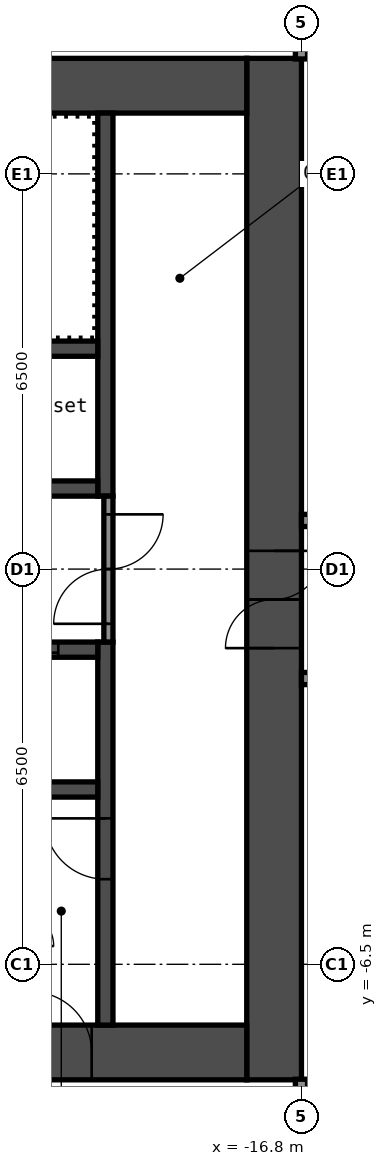
"""IFC4 building model, lengths in metres.
Left out: names, types, materials, properties, quantities, classifications, styles, units other than length and angle.
Written with IfcOpenShell. Run it as: python <this file> out.ifc"""

import sys

from ifc_helpers import new_model, si_unit, direction, frame, frame_2d, origin, place, context, subcontext, project, spatial, rectangle, extrude, element, fill, save


model = new_model("IFC4")
c1 = context("Model", 3, precision=1e-05, world=origin(), true_north=direction((0.0, 1.0)))
c2 = subcontext(c1, "Body", "Model", "MODEL_VIEW")
j1 = project(units=[si_unit("LENGTHUNIT", "METRE"), si_unit("PLANEANGLEUNIT", "RADIAN")], contexts=[c1])
p1 = place(None, origin())
s1 = spatial("IfcSite", under=j1, at=p1, CompositionType="ELEMENT")
p2 = place(p1, origin())
s2 = spatial("IfcBuilding", under=s1, at=p2, CompositionType="ELEMENT")
p3 = place(p2, frame((0.0, 0.0, 131.0)))
s3 = spatial("IfcBuildingStorey", under=s2, at=p3, CompositionType="ELEMENT", Elevation=131.0)
p4 = place(p3, frame((-17.25, -8.4, 0.0), z_axis=(0.0, 0.0, 1.0), x_axis=(0.0, 1.0, 0.0)))
e1 = element("IfcWall", 1, at=p4, inside=s3, PredefinedType="SHEAR", context=c2, shape_type="SweptSolid", body=[
    extrude(rectangle(XDim=16.8, YDim=0.9, at=frame_2d((8.4, 0.0))), origin(), (0.0, 0.0, 1.0), 2.75),
])
p5 = place(p4, frame((7.1, 0.0, 0.0)))
e2 = element("IfcOpeningElement", 2, at=p5, cuts=e1, PredefinedType="OPENING", context=c2, shape_type="SweptSolid", body=[
    extrude(rectangle(XDim=1.6, YDim=2.1, at=frame_2d((0.8, 1.05))), frame((0.0, 0.46, 0.0), z_axis=(0.0, -1.0, 0.0), x_axis=(1.0, 0.0, 0.0)), (0.0, 0.0, 1.0), 0.92),
])
p6 = place(p3, frame((-32.7, 7.95, 0.0), z_axis=(0.0, 0.0, 1.0), x_axis=(1.0, 0.0, 0.0)))
e3 = element("IfcWall", 3, at=p6, inside=s3, PredefinedType="SHEAR", context=c2, shape_type="SweptSolid", body=[
    extrude(rectangle(XDim=15.0, YDim=0.9, at=frame_2d((7.5, 0.0))), origin(), (0.0, 0.0, 1.0), 2.75),
])
p7 = place(p6, frame((3.4, 0.0, 0.0)))
e4 = element("IfcOpeningElement", 4, at=p7, cuts=e3, PredefinedType="OPENING", context=c2, shape_type="SweptSolid", body=[
    extrude(rectangle(XDim=1.2, YDim=2.1, at=frame_2d((0.6, 1.05))), frame((0.0, 0.46, 0.0), z_axis=(0.0, -1.0, 0.0), x_axis=(1.0, 0.0, 0.0)), (0.0, 0.0, 1.0), 0.92),
])
p8 = place(p6, frame((0.75, 0.0, 0.0)))
e5 = element("IfcOpeningElement", 5, at=p8, cuts=e3, PredefinedType="OPENING", context=c2, shape_type="SweptSolid", body=[
    extrude(rectangle(XDim=0.9, YDim=2.1, at=frame_2d((0.45, 1.05))), frame((0.0, 0.46, 0.0), z_axis=(0.0, -1.0, 0.0), x_axis=(1.0, 0.0, 0.0)), (0.0, 0.0, 1.0), 0.92),
])
p9 = place(p3, frame((-32.7, -7.95, 0.0), z_axis=(0.0, 0.0, 1.0), x_axis=(1.0, 0.0, 0.0)))
e6 = element("IfcWall", 6, at=p9, inside=s3, PredefinedType="SHEAR", context=c2, shape_type="SweptSolid", body=[
    extrude(rectangle(XDim=15.0, YDim=0.9, at=frame_2d((7.5, 0.0))), origin(), (0.0, 0.0, 1.0), 2.75),
])
p10 = place(p9, frame((11.45, 0.0, 0.0)))
e7 = element("IfcOpeningElement", 7, at=p10, cuts=e6, PredefinedType="OPENING", context=c2, shape_type="SweptSolid", body=[
    extrude(rectangle(XDim=1.0, YDim=2.1, at=frame_2d((0.5, 1.05))), frame((0.0, 0.46, 0.0), z_axis=(0.0, -1.0, 0.0), x_axis=(1.0, 0.0, 0.0)), (0.0, 0.0, 1.0), 0.92),
])
p11 = place(p3, frame((-20.025, 1.2, 0.0), z_axis=(0.0, 0.0, 1.0), x_axis=(0.0, 1.0, 0.0)))
e8 = element("IfcWall", 8, at=p11, inside=s3, PredefinedType="SHEAR", context=c2, shape_type="SweptSolid", body=[
    extrude(rectangle(XDim=6.3, YDim=0.25, at=frame_2d((3.15, 0.0))), origin(), (0.0, 0.0, 1.0), 2.75),
])
p12 = place(p3, frame((-20.025, -7.5, 0.0), z_axis=(0.0, 0.0, 1.0), x_axis=(0.0, 1.0, 0.0)))
e9 = element("IfcWall", 9, at=p12, inside=s3, PredefinedType="SHEAR", context=c2, shape_type="SweptSolid", body=[
    extrude(rectangle(XDim=6.3, YDim=0.25, at=frame_2d((3.15, 0.0))), origin(), (0.0, 0.0, 1.0), 2.75),
])
p13 = place(p12, frame((2.4, 0.0, 0.0)))
e10 = element("IfcOpeningElement", 10, at=p13, cuts=e9, PredefinedType="OPENING", context=c2, shape_type="SweptSolid", body=[
    extrude(rectangle(XDim=1.0, YDim=2.1, at=frame_2d((0.5, 1.05))), frame((0.0, 0.135, 0.0), z_axis=(0.0, -1.0, 0.0), x_axis=(1.0, 0.0, 0.0)), (0.0, 0.0, 1.0), 0.27),
])
p14 = place(p3, frame((-27.65, 1.325, 0.0), z_axis=(0.0, 0.0, 1.0), x_axis=(1.0, 0.0, 0.0)))
e11 = element("IfcWall", 11, at=p14, inside=s3, PredefinedType="SHEAR", context=c2, shape_type="SweptSolid", body=[
    extrude(rectangle(XDim=7.5, YDim=0.25, at=frame_2d((3.75, 0.0))), origin(), (0.0, 0.0, 1.0), 2.75),
])
p15 = place(p14, frame((4.762, 0.0, 0.0)))
e12 = element("IfcOpeningElement", 12, at=p15, cuts=e11, PredefinedType="OPENING", context=c2, shape_type="SweptSolid", body=[
    extrude(rectangle(XDim=0.9, YDim=2.1, at=frame_2d((0.45, 1.05))), frame((0.0, 0.135, 0.0), z_axis=(0.0, -1.0, 0.0), x_axis=(1.0, 0.0, 0.0)), (0.0, 0.0, 1.0), 0.27),
])
p16 = place(p14, frame((1.062, 0.0, 0.0)))
e13 = element("IfcOpeningElement", 13, at=p16, cuts=e11, PredefinedType="OPENING", context=c2, shape_type="SweptSolid", body=[
    extrude(rectangle(XDim=0.9, YDim=2.1, at=frame_2d((0.45, 1.05))), frame((0.0, 0.135, 0.0), z_axis=(0.0, -1.0, 0.0), x_axis=(1.0, 0.0, 0.0)), (0.0, 0.0, 1.0), 0.27),
])
p17 = place(p3, frame((-27.65, 3.625, 0.0), z_axis=(0.0, 0.0, 1.0), x_axis=(1.0, 0.0, 0.0)))
e14 = element("IfcWall", 14, at=p17, inside=s3, PredefinedType="SHEAR", context=c2, shape_type="SweptSolid", body=[
    extrude(rectangle(XDim=7.5, YDim=0.25, at=frame_2d((3.75, 0.0))), origin(), (0.0, 0.0, 1.0), 2.75),
])
p18 = place(p3, frame((-27.65, -1.325, 0.0), z_axis=(0.0, 0.0, 1.0), x_axis=(1.0, 0.0, 0.0)))
e15 = element("IfcWall", 15, at=p18, inside=s3, PredefinedType="SHEAR", context=c2, shape_type="SweptSolid", body=[
    extrude(rectangle(XDim=7.5, YDim=0.25, at=frame_2d((3.75, 0.0))), origin(), (0.0, 0.0, 1.0), 2.75),
])
p19 = place(p18, frame((5.75, 0.0, 0.0)))
e16 = element("IfcOpeningElement", 16, at=p19, cuts=e15, PredefinedType="OPENING", context=c2, shape_type="SweptSolid", body=[
    extrude(rectangle(XDim=1.1, YDim=2.1, at=frame_2d((0.55, 1.05))), frame((0.0, 0.135, 0.0), z_axis=(0.0, -1.0, 0.0), x_axis=(1.0, 0.0, 0.0)), (0.0, 0.0, 1.0), 0.27),
])
p20 = place(p18, frame((3.35, 0.0, 0.0)))
e17 = element("IfcOpeningElement", 17, at=p20, cuts=e15, PredefinedType="OPENING", context=c2, shape_type="SweptSolid", body=[
    extrude(rectangle(XDim=1.1, YDim=2.1, at=frame_2d((0.55, 1.05))), frame((0.0, 0.135, 0.0), z_axis=(0.0, -1.0, 0.0), x_axis=(1.0, 0.0, 0.0)), (0.0, 0.0, 1.0), 0.27),
])
p21 = place(p18, frame((0.95, 0.0, 0.0)))
e18 = element("IfcOpeningElement", 18, at=p21, cuts=e15, PredefinedType="OPENING", context=c2, shape_type="SweptSolid", body=[
    extrude(rectangle(XDim=1.1, YDim=2.1, at=frame_2d((0.55, 1.05))), frame((0.0, 0.135, 0.0), z_axis=(0.0, -1.0, 0.0), x_axis=(1.0, 0.0, 0.0)), (0.0, 0.0, 1.0), 0.27),
])
p22 = place(p3, frame((-27.65, -3.625, 0.0), z_axis=(0.0, 0.0, 1.0), x_axis=(1.0, 0.0, 0.0)))
e19 = element("IfcWall", 19, at=p22, inside=s3, PredefinedType="SHEAR", context=c2, shape_type="SweptSolid", body=[
    extrude(rectangle(XDim=7.5, YDim=0.25, at=frame_2d((3.75, 0.0))), origin(), (0.0, 0.0, 1.0), 2.75),
])
p23 = place(p3, frame((-19.975, -1.2, 0.0), z_axis=(0.0, 0.0, 1.0), x_axis=(0.0, 1.0, 0.0)))
e20 = element("IfcWall", 20, at=p23, inside=s3, PredefinedType="PARTITIONING", context=c2, shape_type="SweptSolid", body=[
    extrude(rectangle(XDim=2.4, YDim=0.15, at=frame_2d((1.2, 0.0))), origin(), (0.0, 0.0, 1.0), 2.75),
])
p24 = place(p23, frame((0.3, 0.0, 0.0)))
e21 = element("IfcOpeningElement", 21, at=p24, cuts=e20, PredefinedType="OPENING", context=c2, shape_type="SweptSolid", body=[
    extrude(rectangle(XDim=1.8, YDim=2.1, at=frame_2d((0.9, 1.05))), frame((0.0, 0.085, 0.0), z_axis=(0.0, -1.0, 0.0), x_axis=(1.0, 0.0, 0.0)), (0.0, 0.0, 1.0), 0.17),
])
p25 = place(p3, frame((-16.8, -1.8, 0.0), z_axis=(0.0, 0.0, 1.0), x_axis=(1.0, 0.0, 0.0)))
e22 = element("IfcWall", 22, at=p25, inside=s3, PredefinedType="PARTITIONING", context=c2, shape_type="SweptSolid", body=[
    extrude(rectangle(XDim=33.6, YDim=0.2, at=frame_2d((16.8, 0.0))), origin(), (0.0, 0.0, 1.0), 2.75),
])
p26 = place(p25, frame((2.0, 0.0, 0.0)))
e23 = element("IfcOpeningElement", 23, at=p26, cuts=e22, PredefinedType="OPENING", context=c2, shape_type="SweptSolid", body=[
    extrude(rectangle(XDim=1.0, YDim=2.1, at=frame_2d((0.5, 1.05))), frame((0.0, 0.11, 0.0), z_axis=(0.0, -1.0, 0.0), x_axis=(1.0, 0.0, 0.0)), (0.0, 0.0, 1.0), 0.22),
])
p27 = place(p25, frame((10.47, 0.0, 0.0)))
e24 = element("IfcOpeningElement", 24, at=p27, cuts=e22, PredefinedType="OPENING", context=c2, shape_type="SweptSolid", body=[
    extrude(rectangle(XDim=0.9, YDim=2.1, at=frame_2d((0.45, 1.05))), frame((0.0, 0.11, 0.0), z_axis=(0.0, -1.0, 0.0), x_axis=(1.0, 0.0, 0.0)), (0.0, 0.0, 1.0), 0.22),
])
p28 = place(p25, frame((14.67, 0.0, 0.0)))
e25 = element("IfcOpeningElement", 25, at=p28, cuts=e22, PredefinedType="OPENING", context=c2, shape_type="SweptSolid", body=[
    extrude(rectangle(XDim=0.9, YDim=2.1, at=frame_2d((0.45, 1.05))), frame((0.0, 0.11, 0.0), z_axis=(0.0, -1.0, 0.0), x_axis=(1.0, 0.0, 0.0)), (0.0, 0.0, 1.0), 0.22),
])
p29 = place(p25, frame((18.8, 0.0, 0.0)))
e26 = element("IfcOpeningElement", 26, at=p29, cuts=e22, PredefinedType="OPENING", context=c2, shape_type="SweptSolid", body=[
    extrude(rectangle(XDim=1.0, YDim=2.1, at=frame_2d((0.5, 1.05))), frame((0.0, 0.11, 0.0), z_axis=(0.0, -1.0, 0.0), x_axis=(1.0, 0.0, 0.0)), (0.0, 0.0, 1.0), 0.22),
])
p30 = place(p25, frame((27.2, 0.0, 0.0)))
e27 = element("IfcOpeningElement", 27, at=p30, cuts=e22, PredefinedType="OPENING", context=c2, shape_type="SweptSolid", body=[
    extrude(rectangle(XDim=1.0, YDim=2.1, at=frame_2d((0.5, 1.05))), frame((0.0, 0.11, 0.0), z_axis=(0.0, -1.0, 0.0), x_axis=(1.0, 0.0, 0.0)), (0.0, 0.0, 1.0), 0.22),
])
p31 = place(p3, frame((-16.8, 0.8, 0.0), z_axis=(0.0, 0.0, 1.0), x_axis=(1.0, 0.0, 0.0)))
e28 = element("IfcWall", 28, at=p31, inside=s3, PredefinedType="PARTITIONING", context=c2, shape_type="SweptSolid", body=[
    extrude(rectangle(XDim=33.6, YDim=0.2, at=frame_2d((16.8, 0.0))), origin(), (0.0, 0.0, 1.0), 2.75),
])
p32 = place(p31, frame((2.0, 0.0, 0.0)))
e29 = element("IfcOpeningElement", 29, at=p32, cuts=e28, PredefinedType="OPENING", context=c2, shape_type="SweptSolid", body=[
    extrude(rectangle(XDim=1.0, YDim=2.1, at=frame_2d((0.5, 1.05))), frame((0.0, 0.11, 0.0), z_axis=(0.0, -1.0, 0.0), x_axis=(1.0, 0.0, 0.0)), (0.0, 0.0, 1.0), 0.22),
])
p33 = place(p31, frame((12.1, 0.0, 0.0)))
e30 = element("IfcOpeningElement", 30, at=p33, cuts=e28, PredefinedType="OPENING", context=c2, shape_type="SweptSolid", body=[
    extrude(rectangle(XDim=1.0, YDim=2.1, at=frame_2d((0.5, 1.05))), frame((0.0, 0.11, 0.0), z_axis=(0.0, -1.0, 0.0), x_axis=(1.0, 0.0, 0.0)), (0.0, 0.0, 1.0), 0.22),
])
p34 = place(p31, frame((18.03, 0.0, 0.0)))
e31 = element("IfcOpeningElement", 31, at=p34, cuts=e28, PredefinedType="OPENING", context=c2, shape_type="SweptSolid", body=[
    extrude(rectangle(XDim=0.9, YDim=2.1, at=frame_2d((0.45, 1.05))), frame((0.0, 0.11, 0.0), z_axis=(0.0, -1.0, 0.0), x_axis=(1.0, 0.0, 0.0)), (0.0, 0.0, 1.0), 0.22),
])
p35 = place(p31, frame((22.23, 0.0, 0.0)))
e32 = element("IfcOpeningElement", 32, at=p35, cuts=e28, PredefinedType="OPENING", context=c2, shape_type="SweptSolid", body=[
    extrude(rectangle(XDim=0.9, YDim=2.1, at=frame_2d((0.45, 1.05))), frame((0.0, 0.11, 0.0), z_axis=(0.0, -1.0, 0.0), x_axis=(1.0, 0.0, 0.0)), (0.0, 0.0, 1.0), 0.22),
])
p36 = place(p31, frame((30.6, 0.0, 0.0)))
e33 = element("IfcOpeningElement", 33, at=p36, cuts=e28, PredefinedType="OPENING", context=c2, shape_type="SweptSolid", body=[
    extrude(rectangle(XDim=1.0, YDim=2.1, at=frame_2d((0.5, 1.05))), frame((0.0, 0.11, 0.0), z_axis=(0.0, -1.0, 0.0), x_axis=(1.0, 0.0, 0.0)), (0.0, 0.0, 1.0), 0.22),
])
p37 = place(p3, frame((-16.8, -19.3, 0.0), z_axis=(0.0, 0.0, 1.0), x_axis=(0.0, 1.0, 0.0)))
e34 = element("IfcWall", 34, at=p37, inside=s3, PredefinedType="PARTITIONING", context=c2, shape_type="SweptSolid", body=[
    extrude(rectangle(XDim=10.91, YDim=0.2, at=frame_2d((5.455, 0.0))), origin(), (0.0, 0.0, 1.0), 2.75),
])
p38 = place(p3, frame((-16.8, 8.39, 0.0), z_axis=(0.0, 0.0, 1.0), x_axis=(0.0, 1.0, 0.0)))
e35 = element("IfcWall", 35, at=p38, inside=s3, PredefinedType="PARTITIONING", context=c2, shape_type="SweptSolid", body=[
    extrude(rectangle(XDim=9.91, YDim=0.2, at=frame_2d((4.955, 0.0))), origin(), (0.0, 0.0, 1.0), 2.75),
])
p39 = place(p5, origin())
e36 = element("IfcDoor", 36, at=p39, inside=s3, OperationType="DOUBLE_DOOR_SINGLE_SWING", PredefinedType="DOOR", context=c2, shape_type="SweptSolid", body=[
    extrude(rectangle(XDim=1.6, YDim=2.1, at=frame_2d((0.8, 1.05))), frame((0.0, 0.025, 0.0), z_axis=(0.0, -1.0, 0.0), x_axis=(1.0, 0.0, 0.0)), (0.0, 0.0, 1.0), 0.05),
])
fill(e2, e36)
p40 = place(p10, origin())
e37 = element("IfcDoor", 37, at=p40, inside=s3, OperationType="SINGLE_SWING_RIGHT", PredefinedType="DOOR", context=c2, shape_type="SweptSolid", body=[
    extrude(rectangle(XDim=1.0, YDim=2.1, at=frame_2d((0.5, 1.05))), frame((0.0, 0.025, 0.0), z_axis=(0.0, -1.0, 0.0), x_axis=(1.0, 0.0, 0.0)), (0.0, 0.0, 1.0), 0.05),
])
fill(e7, e37)
p41 = place(p13, origin())
e38 = element("IfcDoor", 38, at=p41, inside=s3, OperationType="SINGLE_SWING_LEFT", PredefinedType="DOOR", context=c2, shape_type="SweptSolid", body=[
    extrude(rectangle(XDim=1.0, YDim=2.1, at=frame_2d((0.5, 1.05))), frame((0.0, 0.025, 0.0), z_axis=(0.0, -1.0, 0.0), x_axis=(1.0, 0.0, 0.0)), (0.0, 0.0, 1.0), 0.05),
])
fill(e10, e38)
p42 = place(p24, origin())
e39 = element("IfcDoor", 39, at=p42, inside=s3, OperationType="DOUBLE_DOOR_SINGLE_SWING", PredefinedType="DOOR", context=c2, shape_type="SweptSolid", body=[
    extrude(rectangle(XDim=1.8, YDim=2.1, at=frame_2d((0.9, 1.05))), frame((0.0, 0.025, 0.0), z_axis=(0.0, -1.0, 0.0), x_axis=(1.0, 0.0, 0.0)), (0.0, 0.0, 1.0), 0.05),
])
fill(e21, e39)
p43 = place(p19, origin())
e40 = element("IfcDoor", 40, at=p43, inside=s3, OperationType="DOUBLE_DOOR_SLIDING", PredefinedType="DOOR", context=c2, shape_type="SweptSolid", body=[
    extrude(rectangle(XDim=1.1, YDim=2.1, at=frame_2d((0.55, 1.05))), frame((0.0, 0.025, 0.0), z_axis=(0.0, -1.0, 0.0), x_axis=(1.0, 0.0, 0.0)), (0.0, 0.0, 1.0), 0.05),
])
fill(e16, e40)
save(model, sys.argv[1])
